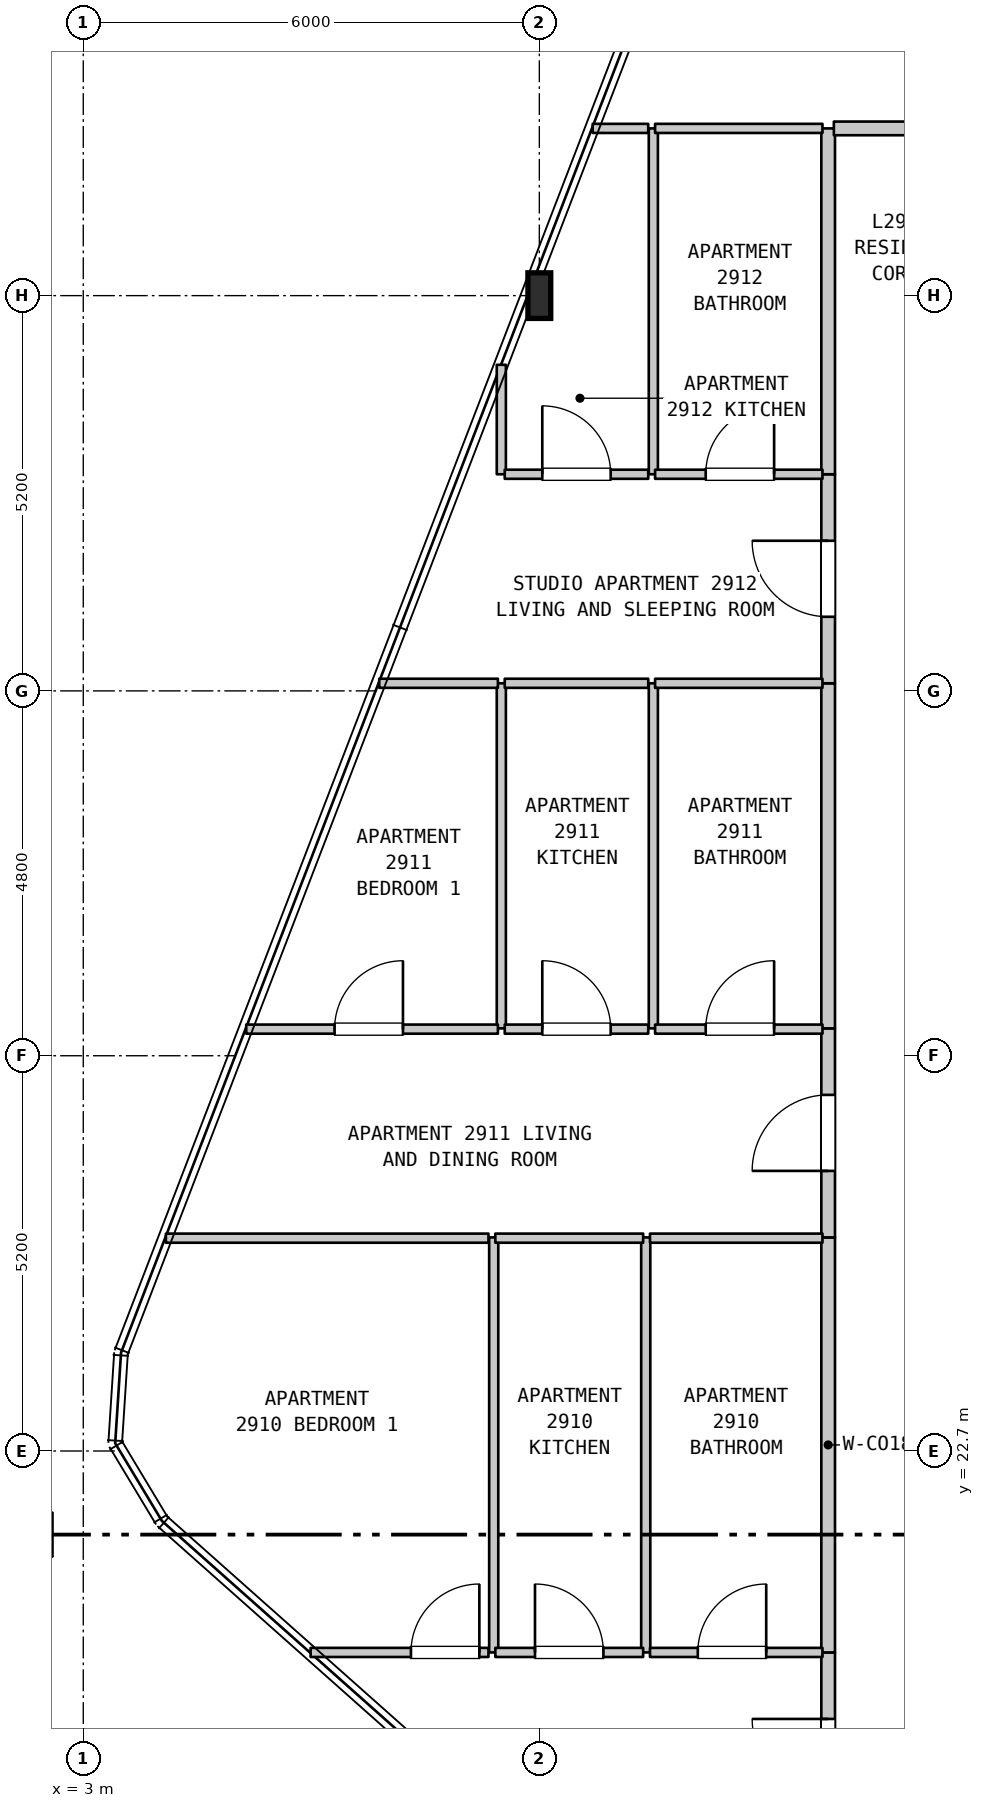
"""IFC4 building model, lengths in metres.
Left out: names, types, materials, properties, quantities, classifications, styles, units other than length and angle.
Written with IfcOpenShell. Run it as: python <this file> out.ifc"""

import sys

from ifc_helpers import new_model, si_unit, direction, frame, frame_2d, origin, origin_2d, place, context, subcontext, project, spatial, rectangle, i_section, extrude, element, fill, save


model = new_model("IFC4")
c1 = context("Model", 3, precision=1e-05, world=origin(), true_north=direction((0.0, 1.0)))
c2 = subcontext(c1, "Body", "Model", "MODEL_VIEW")
j1 = project(units=[si_unit("LENGTHUNIT", "METRE"), si_unit("PLANEANGLEUNIT", "RADIAN")], contexts=[c1])
p1 = place(None, origin())
s1 = spatial("IfcSite", under=j1, at=p1, CompositionType="ELEMENT")
p2 = place(p1, origin())
s2 = spatial("IfcBuilding", under=s1, at=p2, CompositionType="ELEMENT")
p3 = place(p2, frame((0.0, 0.0, 120.5)))
s3 = spatial("IfcBuildingStorey", under=s2, at=p3, CompositionType="ELEMENT", Elevation=120.5)
p4 = place(p3, frame((9.0, 37.9, 0.0), z_axis=(0.0, 0.0, 1.0), x_axis=(1.0, 0.0, 0.0)))
e1 = element("IfcColumn", 1, at=p4, inside=s3, PredefinedType="COLUMN", context=c2, shape_type="SweptSolid", body=[
    extrude(i_section(OverallWidth=0.3, OverallDepth=0.6, WebThickness=0.015, FlangeThickness=0.03, FilletRadius=0.027, at=origin_2d()), origin(), (0.0, 0.0, 1.0), 4.8),
])
p5 = place(p3, frame((8.4, 20.05, 0.0), z_axis=(0.0, 0.0, 1.0), x_axis=(0.0, 1.0, 0.0)))
e2 = element("IfcWall", 2, at=p5, inside=s3, PredefinedType="PARTITIONING", context=c2, shape_type="SweptSolid", body=[
    extrude(rectangle(XDim=5.46, YDim=0.12, at=frame_2d((2.73, 0.0))), origin(), (0.0, 0.0, 1.0), 4.48),
])
p6 = place(p3, frame((8.5, 28.26, 0.0), z_axis=(0.0, 0.0, 1.0), x_axis=(0.0, 1.0, 0.0)))
e3 = element("IfcWall", 3, at=p6, inside=s3, PredefinedType="PARTITIONING", context=c2, shape_type="SweptSolid", body=[
    extrude(rectangle(XDim=4.54, YDim=0.12, at=frame_2d((2.27, 0.0))), origin(), (0.0, 0.0, 1.0), 4.48),
])
p7 = place(p3, frame((8.5, 35.55, 0.0), z_axis=(0.0, 0.0, 1.0), x_axis=(0.0, 1.0, 0.0)))
e4 = element("IfcWall", 4, at=p7, inside=s3, PredefinedType="PARTITIONING", context=c2, shape_type="SweptSolid", body=[
    extrude(rectangle(XDim=1.44, YDim=0.12, at=frame_2d((0.72, 0.0))), origin(), (0.0, 0.0, 1.0), 4.48),
])
p8 = place(p3, frame((10.4, 20.05, 0.0), z_axis=(0.0, 0.0, 1.0), x_axis=(0.0, 1.0, 0.0)))
e5 = element("IfcWall", 5, at=p8, inside=s3, PredefinedType="PARTITIONING", context=c2, shape_type="SweptSolid", body=[
    extrude(rectangle(XDim=5.46, YDim=0.12, at=frame_2d((2.73, 0.0))), origin(), (0.0, 0.0, 1.0), 4.48),
])
p9 = place(p3, frame((10.5, 28.26, 0.0), z_axis=(0.0, 0.0, 1.0), x_axis=(0.0, 1.0, 0.0)))
e6 = element("IfcWall", 6, at=p9, inside=s3, PredefinedType="PARTITIONING", context=c2, shape_type="SweptSolid", body=[
    extrude(rectangle(XDim=4.54, YDim=0.12, at=frame_2d((2.27, 0.0))), origin(), (0.0, 0.0, 1.0), 4.48),
])
p10 = place(p3, frame((10.5, 35.55, 0.0), z_axis=(0.0, 0.0, 1.0), x_axis=(0.0, 1.0, 0.0)))
e7 = element("IfcWall", 7, at=p10, inside=s3, PredefinedType="PARTITIONING", context=c2, shape_type="SweptSolid", body=[
    extrude(rectangle(XDim=4.55, YDim=0.12, at=frame_2d((2.275, 0.0))), origin(), (0.0, 0.0, 1.0), 4.48),
])
p11 = place(p3, frame((12.8, 17.3, 0.0), z_axis=(0.0, 0.0, 1.0), x_axis=(0.0, 1.0, 0.0)))
e8 = element("IfcWall", 8, at=p11, inside=s3, PredefinedType="STANDARD", context=c2, shape_type="SweptSolid", body=[
    extrude(rectangle(XDim=2.75, YDim=0.18, at=frame_2d((1.375, 0.0))), origin(), (0.0, 0.0, 1.0), 4.48),
])
p12 = place(p11, frame((0.875, 0.0, 0.0)))
e9 = element("IfcOpeningElement", 9, at=p12, cuts=e8, PredefinedType="OPENING", context=c2, shape_type="SweptSolid", body=[
    extrude(rectangle(XDim=1.0, YDim=2.15, at=frame_2d((0.5, 1.075))), frame((0.0, 0.1, 0.0), z_axis=(0.0, -1.0, 0.0), x_axis=(1.0, 0.0, 0.0)), (0.0, 0.0, 1.0), 0.2),
])
p13 = place(p3, frame((12.8, 20.05, 0.0), z_axis=(0.0, 0.0, 1.0), x_axis=(0.0, 1.0, 0.0)))
e10 = element("IfcWall", 10, at=p13, inside=s3, PredefinedType="STANDARD", context=c2, shape_type="SweptSolid", body=[
    extrude(rectangle(XDim=5.46, YDim=0.18, at=frame_2d((2.73, 0.0))), origin(), (0.0, 0.0, 1.0), 4.48),
])
p14 = place(p3, frame((12.8, 25.51, 0.0), z_axis=(0.0, 0.0, 1.0), x_axis=(0.0, 1.0, 0.0)))
e11 = element("IfcWall", 11, at=p14, inside=s3, PredefinedType="STANDARD", context=c2, shape_type="SweptSolid", body=[
    extrude(rectangle(XDim=2.75, YDim=0.18, at=frame_2d((1.375, 0.0))), origin(), (0.0, 0.0, 1.0), 4.48),
])
p15 = place(p14, frame((0.875, 0.0, 0.0)))
e12 = element("IfcOpeningElement", 12, at=p15, cuts=e11, PredefinedType="OPENING", context=c2, shape_type="SweptSolid", body=[
    extrude(rectangle(XDim=1.0, YDim=2.15, at=frame_2d((0.5, 1.075))), frame((0.0, 0.1, 0.0), z_axis=(0.0, -1.0, 0.0), x_axis=(1.0, 0.0, 0.0)), (0.0, 0.0, 1.0), 0.2),
])
p16 = place(p3, frame((12.8, 28.26, 0.0), z_axis=(0.0, 0.0, 1.0), x_axis=(0.0, 1.0, 0.0)))
e13 = element("IfcWall", 13, at=p16, inside=s3, PredefinedType="STANDARD", context=c2, shape_type="SweptSolid", body=[
    extrude(rectangle(XDim=4.54, YDim=0.18, at=frame_2d((2.27, 0.0))), origin(), (0.0, 0.0, 1.0), 4.48),
])
p17 = place(p3, frame((12.8, 32.8, 0.0), z_axis=(0.0, 0.0, 1.0), x_axis=(0.0, 1.0, 0.0)))
e14 = element("IfcWall", 14, at=p17, inside=s3, PredefinedType="STANDARD", context=c2, shape_type="SweptSolid", body=[
    extrude(rectangle(XDim=2.75, YDim=0.18, at=frame_2d((1.375, 0.0))), origin(), (0.0, 0.0, 1.0), 4.48),
])
p18 = place(p17, frame((0.875, 0.0, 0.0)))
e15 = element("IfcOpeningElement", 15, at=p18, cuts=e14, PredefinedType="OPENING", context=c2, shape_type="SweptSolid", body=[
    extrude(rectangle(XDim=1.0, YDim=2.15, at=frame_2d((0.5, 1.075))), frame((0.0, 0.1, 0.0), z_axis=(0.0, -1.0, 0.0), x_axis=(1.0, 0.0, 0.0)), (0.0, 0.0, 1.0), 0.2),
])
p19 = place(p3, frame((12.8, 35.55, 0.0), z_axis=(0.0, 0.0, 1.0), x_axis=(0.0, 1.0, 0.0)))
e16 = element("IfcWall", 16, at=p19, inside=s3, PredefinedType="STANDARD", context=c2, shape_type="SweptSolid", body=[
    extrude(rectangle(XDim=4.55, YDim=0.18, at=frame_2d((2.275, 0.0))), origin(), (0.0, 0.0, 1.0), 4.48),
])
p20 = place(p3, frame((5.991, 20.05, 0.0), z_axis=(0.0, 0.0, 1.0), x_axis=(1.0, 0.0, 0.0)))
e17 = element("IfcWall", 17, at=p20, inside=s3, PredefinedType="PARTITIONING", context=c2, shape_type="SweptSolid", body=[
    extrude(rectangle(XDim=2.34, YDim=0.12, at=frame_2d((1.17, 0.0))), origin(), (0.0, 0.0, 1.0), 4.48),
])
p21 = place(p20, frame((1.32, 0.0, 0.0)))
e18 = element("IfcOpeningElement", 18, at=p21, cuts=e17, PredefinedType="OPENING", context=c2, shape_type="SweptSolid", body=[
    extrude(rectangle(XDim=0.9, YDim=2.15, at=frame_2d((0.45, 1.075))), frame((0.0, 0.07, 0.0), z_axis=(0.0, -1.0, 0.0), x_axis=(1.0, 0.0, 0.0)), (0.0, 0.0, 1.0), 0.14),
])
p22 = place(p3, frame((8.421, 20.05, 0.0), z_axis=(0.0, 0.0, 1.0), x_axis=(1.0, 0.0, 0.0)))
e19 = element("IfcWall", 19, at=p22, inside=s3, PredefinedType="PARTITIONING", context=c2, shape_type="SweptSolid", body=[
    extrude(rectangle(XDim=1.945, YDim=0.12, at=frame_2d((0.973, 0.0))), origin(), (0.0, 0.0, 1.0), 4.48),
])
p23 = place(p22, frame((0.522, 0.0, 0.0)))
e20 = element("IfcOpeningElement", 20, at=p23, cuts=e19, PredefinedType="OPENING", context=c2, shape_type="SweptSolid", body=[
    extrude(rectangle(XDim=0.9, YDim=2.15, at=frame_2d((0.45, 1.075))), frame((0.0, 0.07, 0.0), z_axis=(0.0, -1.0, 0.0), x_axis=(1.0, 0.0, 0.0)), (0.0, 0.0, 1.0), 0.14),
])
p24 = place(p3, frame((10.456, 20.05, 0.0), z_axis=(0.0, 0.0, 1.0), x_axis=(1.0, 0.0, 0.0)))
e21 = element("IfcWall", 21, at=p24, inside=s3, PredefinedType="PARTITIONING", context=c2, shape_type="SweptSolid", body=[
    extrude(rectangle(XDim=2.269, YDim=0.12, at=frame_2d((1.135, 0.0))), origin(), (0.0, 0.0, 1.0), 4.48),
])
p25 = place(p24, frame((0.629, 0.0, 0.0)))
e22 = element("IfcOpeningElement", 22, at=p25, cuts=e21, PredefinedType="OPENING", context=c2, shape_type="SweptSolid", body=[
    extrude(rectangle(XDim=0.9, YDim=2.1, at=frame_2d((0.45, 1.05))), frame((0.0, 0.07, 0.0), z_axis=(0.0, -1.0, 0.0), x_axis=(1.0, 0.0, 0.0)), (0.0, 0.0, 1.0), 0.14),
])
p26 = place(p3, frame((4.087, 25.5, 0.0), z_axis=(0.0, 0.0, 1.0), x_axis=(1.0, 0.0, 0.0)))
e23 = element("IfcWall", 23, at=p26, inside=s3, PredefinedType="PARTITIONING", context=c2, shape_type="SweptSolid", body=[
    extrude(rectangle(XDim=4.244, YDim=0.12, at=frame_2d((2.122, 0.0))), origin(), (0.0, 0.0, 1.0), 4.48),
])
p27 = place(p3, frame((8.421, 25.5, 0.0), z_axis=(0.0, 0.0, 1.0), x_axis=(1.0, 0.0, 0.0)))
e24 = element("IfcWall", 24, at=p27, inside=s3, PredefinedType="PARTITIONING", context=c2, shape_type="SweptSolid", body=[
    extrude(rectangle(XDim=1.945, YDim=0.12, at=frame_2d((0.973, 0.0))), origin(), (0.0, 0.0, 1.0), 4.48),
])
p28 = place(p3, frame((10.456, 25.5, 0.0), z_axis=(0.0, 0.0, 1.0), x_axis=(1.0, 0.0, 0.0)))
e25 = element("IfcWall", 25, at=p28, inside=s3, PredefinedType="PARTITIONING", context=c2, shape_type="SweptSolid", body=[
    extrude(rectangle(XDim=2.269, YDim=0.12, at=frame_2d((1.135, 0.0))), origin(), (0.0, 0.0, 1.0), 4.48),
])
p29 = place(p3, frame((5.144, 28.25, 0.0), z_axis=(0.0, 0.0, 1.0), x_axis=(1.0, 0.0, 0.0)))
e26 = element("IfcWall", 26, at=p29, inside=s3, PredefinedType="PARTITIONING", context=c2, shape_type="SweptSolid", body=[
    extrude(rectangle(XDim=3.311, YDim=0.12, at=frame_2d((1.656, 0.0))), origin(), (0.0, 0.0, 1.0), 4.48),
])
p30 = place(p29, frame((1.162, 0.0, 0.0)))
e27 = element("IfcOpeningElement", 27, at=p30, cuts=e26, PredefinedType="OPENING", context=c2, shape_type="SweptSolid", body=[
    extrude(rectangle(XDim=0.9, YDim=2.15, at=frame_2d((0.45, 1.075))), frame((0.0, 0.07, 0.0), z_axis=(0.0, -1.0, 0.0), x_axis=(1.0, 0.0, 0.0)), (0.0, 0.0, 1.0), 0.14),
])
p31 = place(p3, frame((8.545, 28.25, 0.0), z_axis=(0.0, 0.0, 1.0), x_axis=(1.0, 0.0, 0.0)))
e28 = element("IfcWall", 28, at=p31, inside=s3, PredefinedType="PARTITIONING", context=c2, shape_type="SweptSolid", body=[
    extrude(rectangle(XDim=1.888, YDim=0.12, at=frame_2d((0.944, 0.0))), origin(), (0.0, 0.0, 1.0), 4.48),
])
p32 = place(p31, frame((0.494, 0.0, 0.0)))
e29 = element("IfcOpeningElement", 29, at=p32, cuts=e28, PredefinedType="OPENING", context=c2, shape_type="SweptSolid", body=[
    extrude(rectangle(XDim=0.9, YDim=2.15, at=frame_2d((0.45, 1.075))), frame((0.0, 0.07, 0.0), z_axis=(0.0, -1.0, 0.0), x_axis=(1.0, 0.0, 0.0)), (0.0, 0.0, 1.0), 0.14),
])
p33 = place(p3, frame((10.523, 28.25, 0.0), z_axis=(0.0, 0.0, 1.0), x_axis=(1.0, 0.0, 0.0)))
e30 = element("IfcWall", 30, at=p33, inside=s3, PredefinedType="PARTITIONING", context=c2, shape_type="SweptSolid", body=[
    extrude(rectangle(XDim=2.202, YDim=0.12, at=frame_2d((1.101, 0.0))), origin(), (0.0, 0.0, 1.0), 4.48),
])
p34 = place(p33, frame((0.666, 0.0, 0.0)))
e31 = element("IfcOpeningElement", 31, at=p34, cuts=e30, PredefinedType="OPENING", context=c2, shape_type="SweptSolid", body=[
    extrude(rectangle(XDim=0.9, YDim=2.1, at=frame_2d((0.45, 1.05))), frame((0.0, 0.07, 0.0), z_axis=(0.0, -1.0, 0.0), x_axis=(1.0, 0.0, 0.0)), (0.0, 0.0, 1.0), 0.14),
])
p35 = place(p3, frame((6.894, 32.8, 0.0), z_axis=(0.0, 0.0, 1.0), x_axis=(1.0, 0.0, 0.0)))
e32 = element("IfcWall", 32, at=p35, inside=s3, PredefinedType="PARTITIONING", context=c2, shape_type="SweptSolid", body=[
    extrude(rectangle(XDim=1.561, YDim=0.12, at=frame_2d((0.781, 0.0))), origin(), (0.0, 0.0, 1.0), 4.48),
])
p36 = place(p3, frame((8.545, 32.8, 0.0), z_axis=(0.0, 0.0, 1.0), x_axis=(1.0, 0.0, 0.0)))
e33 = element("IfcWall", 33, at=p36, inside=s3, PredefinedType="PARTITIONING", context=c2, shape_type="SweptSolid", body=[
    extrude(rectangle(XDim=1.888, YDim=0.12, at=frame_2d((0.944, 0.0))), origin(), (0.0, 0.0, 1.0), 4.48),
])
p37 = place(p3, frame((10.523, 32.8, 0.0), z_axis=(0.0, 0.0, 1.0), x_axis=(1.0, 0.0, 0.0)))
e34 = element("IfcWall", 34, at=p37, inside=s3, PredefinedType="PARTITIONING", context=c2, shape_type="SweptSolid", body=[
    extrude(rectangle(XDim=2.202, YDim=0.12, at=frame_2d((1.101, 0.0))), origin(), (0.0, 0.0, 1.0), 4.48),
])
p38 = place(p3, frame((8.545, 35.55, 0.0), z_axis=(0.0, 0.0, 1.0), x_axis=(1.0, 0.0, 0.0)))
e35 = element("IfcWall", 35, at=p38, inside=s3, PredefinedType="PARTITIONING", context=c2, shape_type="SweptSolid", body=[
    extrude(rectangle(XDim=1.888, YDim=0.12, at=frame_2d((0.944, 0.0))), origin(), (0.0, 0.0, 1.0), 4.48),
])
p39 = place(p38, frame((0.494, 0.0, 0.0)))
e36 = element("IfcOpeningElement", 36, at=p39, cuts=e35, PredefinedType="OPENING", context=c2, shape_type="SweptSolid", body=[
    extrude(rectangle(XDim=0.9, YDim=2.15, at=frame_2d((0.45, 1.075))), frame((0.0, 0.07, 0.0), z_axis=(0.0, -1.0, 0.0), x_axis=(1.0, 0.0, 0.0)), (0.0, 0.0, 1.0), 0.14),
])
p40 = place(p3, frame((10.523, 35.55, 0.0), z_axis=(0.0, 0.0, 1.0), x_axis=(1.0, 0.0, 0.0)))
e37 = element("IfcWall", 37, at=p40, inside=s3, PredefinedType="PARTITIONING", context=c2, shape_type="SweptSolid", body=[
    extrude(rectangle(XDim=2.202, YDim=0.12, at=frame_2d((1.101, 0.0))), origin(), (0.0, 0.0, 1.0), 4.48),
])
p41 = place(p40, frame((0.666, 0.0, 0.0)))
e38 = element("IfcOpeningElement", 38, at=p41, cuts=e37, PredefinedType="OPENING", context=c2, shape_type="SweptSolid", body=[
    extrude(rectangle(XDim=0.9, YDim=2.1, at=frame_2d((0.45, 1.05))), frame((0.0, 0.07, 0.0), z_axis=(0.0, -1.0, 0.0), x_axis=(1.0, 0.0, 0.0)), (0.0, 0.0, 1.0), 0.14),
])
p42 = place(p3, frame((9.702, 40.1, 0.0), z_axis=(0.0, 0.0, 1.0), x_axis=(1.0, 0.0, 0.0)))
e39 = element("IfcWall", 39, at=p42, inside=s3, PredefinedType="PARTITIONING", context=c2, shape_type="SweptSolid", body=[
    extrude(rectangle(XDim=0.731, YDim=0.12, at=frame_2d((0.366, 0.0))), origin(), (0.0, 0.0, 1.0), 4.48),
])
p43 = place(p3, frame((10.523, 40.1, 0.0), z_axis=(0.0, 0.0, 1.0), x_axis=(1.0, 0.0, 0.0)))
e40 = element("IfcWall", 40, at=p43, inside=s3, PredefinedType="PARTITIONING", context=c2, shape_type="SweptSolid", body=[
    extrude(rectangle(XDim=2.202, YDim=0.12, at=frame_2d((1.101, 0.0))), origin(), (0.0, 0.0, 1.0), 4.48),
])
p44 = place(p3, frame((12.875, 40.1, 0.0), z_axis=(0.0, 0.0, 1.0), x_axis=(1.0, 0.0, 0.0)))
e41 = element("IfcWall", 41, at=p44, inside=s3, PredefinedType="STANDARD", context=c2, shape_type="SweptSolid", body=[
    extrude(rectangle(XDim=5.08, YDim=0.18, at=frame_2d((2.54, 0.0))), origin(), (0.0, 0.0, 1.0), 4.48),
])
p45 = place(p44, frame((2.025, 0.0, 0.0)))
e42 = element("IfcOpeningElement", 42, at=p45, cuts=e41, PredefinedType="OPENING", context=c2, shape_type="SweptSolid", body=[
    extrude(rectangle(XDim=1.0, YDim=2.15, at=frame_2d((0.5, 1.075))), frame((0.0, 0.1, 0.0), z_axis=(0.0, -1.0, 0.0), x_axis=(1.0, 0.0, 0.0)), (0.0, 0.0, 1.0), 0.2),
])
p46 = place(p12, origin())
e43 = element("IfcDoor", 43, at=p46, inside=s3, OperationType="SINGLE_SWING_RIGHT", PredefinedType="DOOR", context=c2, shape_type="SweptSolid", body=[
    extrude(rectangle(XDim=1.0, YDim=2.15, at=frame_2d((0.5, 1.075))), frame((0.0, 0.025, 0.0), z_axis=(0.0, -1.0, 0.0), x_axis=(1.0, 0.0, 0.0)), (0.0, 0.0, 1.0), 0.05),
])
fill(e9, e43)
p47 = place(p15, origin())
e44 = element("IfcDoor", 44, at=p47, inside=s3, OperationType="SINGLE_SWING_LEFT", PredefinedType="DOOR", context=c2, shape_type="SweptSolid", body=[
    extrude(rectangle(XDim=1.0, YDim=2.15, at=frame_2d((0.5, 1.075))), frame((0.0, 0.025, 0.0), z_axis=(0.0, -1.0, 0.0), x_axis=(1.0, 0.0, 0.0)), (0.0, 0.0, 1.0), 0.05),
])
fill(e12, e44)
p48 = place(p18, origin())
e45 = element("IfcDoor", 45, at=p48, inside=s3, OperationType="SINGLE_SWING_RIGHT", PredefinedType="DOOR", context=c2, shape_type="SweptSolid", body=[
    extrude(rectangle(XDim=1.0, YDim=2.15, at=frame_2d((0.5, 1.075))), frame((0.0, 0.025, 0.0), z_axis=(0.0, -1.0, 0.0), x_axis=(1.0, 0.0, 0.0)), (0.0, 0.0, 1.0), 0.05),
])
fill(e15, e45)
p49 = place(p21, origin())
e46 = element("IfcDoor", 46, at=p49, inside=s3, OperationType="SINGLE_SWING_RIGHT", PredefinedType="DOOR", context=c2, shape_type="SweptSolid", body=[
    extrude(rectangle(XDim=0.9, YDim=2.15, at=frame_2d((0.45, 1.075))), frame((0.0, 0.025, 0.0), z_axis=(0.0, -1.0, 0.0), x_axis=(1.0, 0.0, 0.0)), (0.0, 0.0, 1.0), 0.05),
])
fill(e18, e46)
p50 = place(p23, origin())
e47 = element("IfcDoor", 47, at=p50, inside=s3, OperationType="SINGLE_SWING_LEFT", PredefinedType="DOOR", context=c2, shape_type="SweptSolid", body=[
    extrude(rectangle(XDim=0.9, YDim=2.15, at=frame_2d((0.45, 1.075))), frame((0.0, 0.025, 0.0), z_axis=(0.0, -1.0, 0.0), x_axis=(1.0, 0.0, 0.0)), (0.0, 0.0, 1.0), 0.05),
])
fill(e20, e47)
p51 = place(p25, origin())
e48 = element("IfcDoor", 48, at=p51, inside=s3, OperationType="SINGLE_SWING_RIGHT", PredefinedType="DOOR", context=c2, shape_type="SweptSolid", body=[
    extrude(rectangle(XDim=0.9, YDim=2.1, at=frame_2d((0.45, 1.05))), frame((0.0, 0.025, 0.0), z_axis=(0.0, -1.0, 0.0), x_axis=(1.0, 0.0, 0.0)), (0.0, 0.0, 1.0), 0.05),
])
fill(e22, e48)
p52 = place(p30, origin())
e49 = element("IfcDoor", 49, at=p52, inside=s3, OperationType="SINGLE_SWING_RIGHT", PredefinedType="DOOR", context=c2, shape_type="SweptSolid", body=[
    extrude(rectangle(XDim=0.9, YDim=2.15, at=frame_2d((0.45, 1.075))), frame((0.0, 0.025, 0.0), z_axis=(0.0, -1.0, 0.0), x_axis=(1.0, 0.0, 0.0)), (0.0, 0.0, 1.0), 0.05),
])
fill(e27, e49)
p53 = place(p32, origin())
e50 = element("IfcDoor", 50, at=p53, inside=s3, OperationType="SINGLE_SWING_LEFT", PredefinedType="DOOR", context=c2, shape_type="SweptSolid", body=[
    extrude(rectangle(XDim=0.9, YDim=2.15, at=frame_2d((0.45, 1.075))), frame((0.0, 0.025, 0.0), z_axis=(0.0, -1.0, 0.0), x_axis=(1.0, 0.0, 0.0)), (0.0, 0.0, 1.0), 0.05),
])
fill(e29, e50)
p54 = place(p34, origin())
e51 = element("IfcDoor", 51, at=p54, inside=s3, OperationType="SINGLE_SWING_RIGHT", PredefinedType="DOOR", context=c2, shape_type="SweptSolid", body=[
    extrude(rectangle(XDim=0.9, YDim=2.1, at=frame_2d((0.45, 1.05))), frame((0.0, 0.025, 0.0), z_axis=(0.0, -1.0, 0.0), x_axis=(1.0, 0.0, 0.0)), (0.0, 0.0, 1.0), 0.05),
])
fill(e31, e51)
p55 = place(p39, origin())
e52 = element("IfcDoor", 52, at=p55, inside=s3, OperationType="SINGLE_SWING_LEFT", PredefinedType="DOOR", context=c2, shape_type="SweptSolid", body=[
    extrude(rectangle(XDim=0.9, YDim=2.15, at=frame_2d((0.45, 1.075))), frame((0.0, 0.025, 0.0), z_axis=(0.0, -1.0, 0.0), x_axis=(1.0, 0.0, 0.0)), (0.0, 0.0, 1.0), 0.05),
])
fill(e36, e52)
p56 = place(p41, origin())
e53 = element("IfcDoor", 53, at=p56, inside=s3, OperationType="SINGLE_SWING_RIGHT", PredefinedType="DOOR", context=c2, shape_type="SweptSolid", body=[
    extrude(rectangle(XDim=0.9, YDim=2.1, at=frame_2d((0.45, 1.05))), frame((0.0, 0.025, 0.0), z_axis=(0.0, -1.0, 0.0), x_axis=(1.0, 0.0, 0.0)), (0.0, 0.0, 1.0), 0.05),
])
fill(e38, e53)
save(model, sys.argv[1])
